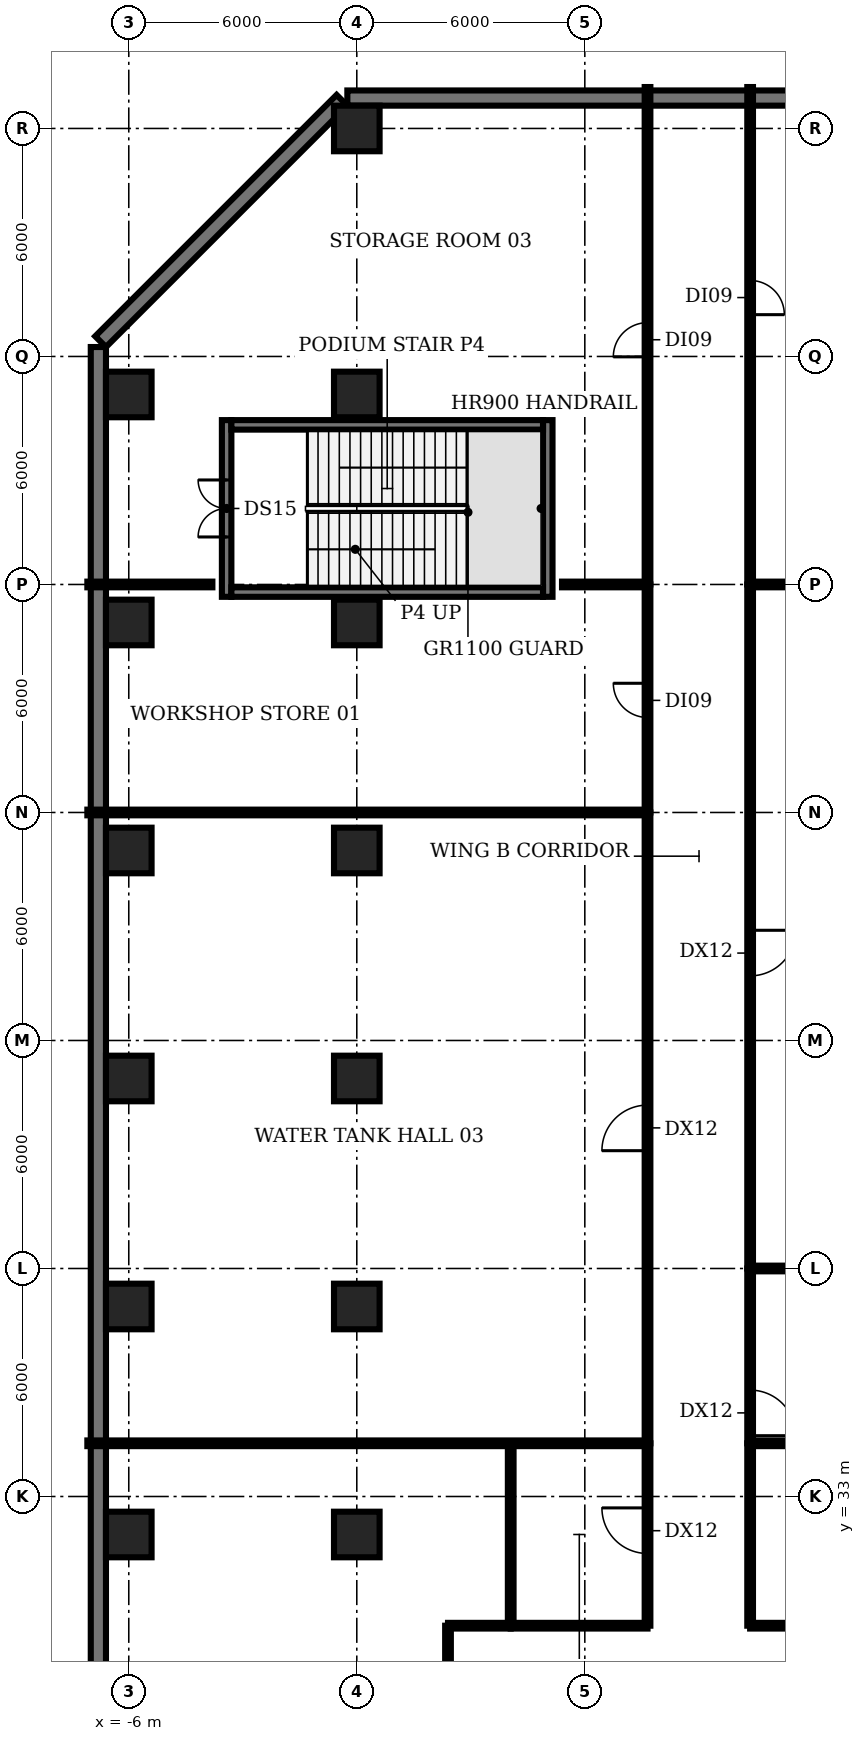
"""IFC4 building model, lengths in metres.
Left out: names, types, materials, properties, quantities, classifications, styles, units other than length and angle.
Written with IfcOpenShell. Run it as: python <this file> out.ifc"""

import sys

from ifc_helpers import new_model, si_unit, direction, frame, frame_2d, origin, origin_2d, place, context, subcontext, project, spatial, rectangle, extrude, element, fill, save


model = new_model("IFC4")
c1 = context("Model", 3, precision=1e-05, world=origin(), true_north=direction((0.0, 1.0)))
c2 = subcontext(c1, "Body", "Model", "MODEL_VIEW")
j1 = project(units=[si_unit("LENGTHUNIT", "METRE"), si_unit("PLANEANGLEUNIT", "RADIAN")], contexts=[c1])
p1 = place(None, origin())
s1 = spatial("IfcSite", under=j1, at=p1, CompositionType="ELEMENT")
p2 = place(p1, origin())
s2 = spatial("IfcBuilding", under=s1, at=p2, CompositionType="ELEMENT")
p3 = place(p2, frame((0.0, 0.0, -6.0)))
s3 = spatial("IfcBuildingStorey", under=s2, at=p3, CompositionType="ELEMENT", Elevation=-6.0)
for number, where, z_axis, x_axis in (
    (1, (-6.0, 32.0, -0.3), (0.0, 0.0, 1.0), (1.0, 0.0, 0.0)),
    (2, (-6.0, 38.0, -0.3), (0.0, 0.0, 1.0), (1.0, 0.0, 0.0)),
    (3, (-6.0, 44.0, -0.3), (0.0, 0.0, 1.0), (1.0, 0.0, 0.0)),
    (4, (-6.0, 50.0, -0.3), (0.0, 0.0, 1.0), (1.0, 0.0, 0.0)),
    (5, (-6.0, 56.0, -0.3), (0.0, 0.0, 1.0), (1.0, 0.0, 0.0)),
    (6, (-6.0, 62.0, -0.3), (0.0, 0.0, 1.0), (1.0, 0.0, 0.0)),
    (7, (0.0, 32.0, -0.3), (0.0, 0.0, 1.0), (1.0, 0.0, 0.0)),
    (8, (0.0, 38.0, -0.3), (0.0, 0.0, 1.0), (1.0, 0.0, 0.0)),
    (9, (0.0, 44.0, -0.3), (0.0, 0.0, 1.0), (1.0, 0.0, 0.0)),
    (10, (0.0, 50.0, -0.3), (0.0, 0.0, 1.0), (1.0, 0.0, 0.0)),
    (11, (0.0, 56.0, -0.3), (0.0, 0.0, 1.0), (1.0, 0.0, 0.0)),
    (12, (0.0, 62.0, -0.3), (0.0, 0.0, 1.0), (1.0, 0.0, 0.0)),
    (13, (0.0, 69.0, -0.3), (0.0, 0.0, 1.0), (1.0, 0.0, 0.0)),
):
    element("IfcColumn", number, at=place(p3, frame(where, z_axis=z_axis, x_axis=x_axis)), inside=s3, PredefinedType="COLUMN", context=c2, shape_type="SweptSolid", body=[
        extrude(rectangle(XDim=1.2, YDim=1.2, at=origin_2d()), origin(), (0.0, 0.0, 1.0), 5.95),
    ])
p4 = place(p3, frame((90.249, 69.8, 0.0), z_axis=(0.0, 0.0, 1.0), x_axis=(-1.0, 0.0, 0.0)))
e14 = element("IfcWall", 14, at=p4, inside=s3, PredefinedType="SOLIDWALL", context=c2, shape_type="SweptSolid", body=[
    extrude(rectangle(XDim=90.497, YDim=0.4, at=frame_2d((45.249, 0.0))), origin(), (0.0, 0.0, 1.0), 5.65),
])
p5 = place(p3, frame((-0.39, 69.741, 0.0), z_axis=(0.0, 0.0, 1.0), x_axis=(-0.707106781187, -0.707106781187, 0.0)))
e15 = element("IfcWall", 15, at=p5, inside=s3, PredefinedType="SOLIDWALL", context=c2, shape_type="SweptSolid", body=[
    extrude(rectangle(XDim=8.982, YDim=0.4, at=frame_2d((4.491, 0.0))), origin(), (0.0, 0.0, 1.0), 5.65),
])
p6 = place(p3, frame((-6.8, 63.249, 0.0), z_axis=(0.0, 0.0, 1.0), x_axis=(0.0, -1.0, 0.0)))
e16 = element("IfcWall", 16, at=p6, inside=s3, PredefinedType="SOLIDWALL", context=c2, shape_type="SweptSolid", body=[
    extrude(rectangle(XDim=66.497, YDim=0.4, at=frame_2d((33.249, 0.0))), origin(), (0.0, 0.0, 1.0), 5.65),
])
p7 = place(p3, frame((-3.425, 56.675, 0.0), z_axis=(0.0, 0.0, 1.0), x_axis=(0.0, 1.0, 0.0)))
e17 = element("IfcWall", 17, at=p7, inside=s3, PredefinedType="SHEAR", context=c2, shape_type="SweptSolid", body=[
    extrude(rectangle(XDim=4.65, YDim=0.25, at=frame_2d((2.325, 0.0))), origin(), (0.0, 0.0, 1.0), 5.65),
])
p8 = place(p7, frame((1.575, 0.0, 0.0)))
e18 = element("IfcOpeningElement", 18, at=p8, cuts=e17, PredefinedType="OPENING", context=c2, shape_type="SweptSolid", body=[
    extrude(rectangle(XDim=1.5, YDim=2.1, at=frame_2d((0.75, 1.05))), frame((0.0, 0.135, 0.0), z_axis=(0.0, -1.0, 0.0), x_axis=(1.0, 0.0, 0.0)), (0.0, 0.0, 1.0), 0.27),
])
p9 = place(p3, frame((5.025, 56.675, 0.0), z_axis=(0.0, 0.0, 1.0), x_axis=(0.0, 1.0, 0.0)))
e19 = element("IfcWall", 19, at=p9, inside=s3, PredefinedType="SHEAR", context=c2, shape_type="SweptSolid", body=[
    extrude(rectangle(XDim=4.65, YDim=0.25, at=frame_2d((2.325, 0.0))), origin(), (0.0, 0.0, 1.0), 5.65),
])
for number, where, z_axis, x_axis in (
    (20, (-3.3, 56.8, 0.0), (0.0, 0.0, 1.0), (1.0, 0.0, 0.0)),
    (21, (-3.3, 61.2, 0.0), (0.0, 0.0, 1.0), (1.0, 0.0, 0.0)),
):
    element("IfcWall", number, at=place(p3, frame(where, z_axis=z_axis, x_axis=x_axis)), inside=s3, PredefinedType="SHEAR", context=c2, shape_type="SweptSolid", body=[
        extrude(rectangle(XDim=8.2, YDim=0.25, at=frame_2d((4.1, 0.0))), origin(), (0.0, 0.0, 1.0), 5.65),
    ])
for number, where, z_axis, x_axis in (
    (22, (-7.09, 34.4, 0.0), (0.0, 0.0, 1.0), (1.0, 0.0, 0.0)),
    (23, (-7.09, 51.0, 0.0), (0.0, 0.0, 1.0), (1.0, 0.0, 0.0)),
):
    element("IfcWall", number, at=place(p3, frame(where, z_axis=z_axis, x_axis=x_axis)), inside=s3, PredefinedType="PARTITIONING", context=c2, shape_type="SweptSolid", body=[
        extrude(rectangle(XDim=14.74, YDim=0.15, at=frame_2d((7.37, 0.0))), origin(), (0.0, 0.0, 1.0), 4.7),
    ])
p10 = place(p3, frame((-7.09, 57.0, 0.0), z_axis=(0.0, 0.0, 1.0), x_axis=(1.0, 0.0, 0.0)))
e24 = element("IfcWall", 24, at=p10, inside=s3, PredefinedType="PARTITIONING", context=c2, shape_type="SweptSolid", body=[
    extrude(rectangle(XDim=3.29, YDim=0.15, at=frame_2d((1.645, 0.0))), origin(), (0.0, 0.0, 1.0), 4.7),
])
p11 = place(p3, frame((2.4, 25.7, 0.0), z_axis=(0.0, 0.0, 1.0), x_axis=(0.0, 1.0, 0.0)))
e25 = element("IfcWall", 25, at=p11, inside=s3, PredefinedType="PARTITIONING", context=c2, shape_type="SweptSolid", body=[
    extrude(rectangle(XDim=3.9, YDim=0.15, at=frame_2d((1.95, 0.0))), origin(), (0.0, 0.0, 1.0), 4.7),
])
p12 = place(p3, frame((2.4, 29.6, 0.0), z_axis=(0.0, 0.0, 1.0), x_axis=(1.0, 0.0, 0.0)))
e26 = element("IfcWall", 26, at=p12, inside=s3, PredefinedType="PARTITIONING", context=c2, shape_type="SweptSolid", body=[
    extrude(rectangle(XDim=1.65, YDim=0.15, at=frame_2d((0.825, 0.0))), origin(), (0.0, 0.0, 1.0), 4.7),
])
p13 = place(p3, frame((4.05, 29.6, 0.0), z_axis=(0.0, 0.0, 1.0), x_axis=(0.0, 1.0, 0.0)))
e27 = element("IfcWall", 27, at=p13, inside=s3, PredefinedType="PARTITIONING", context=c2, shape_type="SweptSolid", body=[
    extrude(rectangle(XDim=4.8, YDim=0.15, at=frame_2d((2.4, 0.0))), origin(), (0.0, 0.0, 1.0), 4.7),
])
p14 = place(p3, frame((4.05, 29.6, 0.0), z_axis=(0.0, 0.0, 1.0), x_axis=(1.0, 0.0, 0.0)))
e28 = element("IfcWall", 28, at=p14, inside=s3, PredefinedType="PARTITIONING", context=c2, shape_type="SweptSolid", body=[
    extrude(rectangle(XDim=3.6, YDim=0.15, at=frame_2d((1.8, 0.0))), origin(), (0.0, 0.0, 1.0), 4.7),
])
p15 = place(p3, frame((5.4, 57.0, 0.0), z_axis=(0.0, 0.0, 1.0), x_axis=(1.0, 0.0, 0.0)))
e29 = element("IfcWall", 29, at=p15, inside=s3, PredefinedType="PARTITIONING", context=c2, shape_type="SweptSolid", body=[
    extrude(rectangle(XDim=2.25, YDim=0.15, at=frame_2d((1.125, 0.0))), origin(), (0.0, 0.0, 1.0), 4.7),
])
p16 = place(p3, frame((7.65, 29.6, 0.0), z_axis=(0.0, 0.0, 1.0), x_axis=(0.0, 1.0, 0.0)))
e30 = element("IfcWall", 30, at=p16, inside=s3, PredefinedType="PARTITIONING", context=c2, shape_type="SweptSolid", body=[
    extrude(rectangle(XDim=4.8, YDim=0.15, at=frame_2d((2.4, 0.0))), origin(), (0.0, 0.0, 1.0), 4.7),
])
p17 = place(p16, frame((1.9, 0.0, 0.0)))
e31 = element("IfcOpeningElement", 31, at=p17, cuts=e30, PredefinedType="OPENING", context=c2, shape_type="SweptSolid", body=[
    extrude(rectangle(XDim=1.2, YDim=2.1, at=frame_2d((0.6, 1.05))), frame((0.0, 0.085, 0.0), z_axis=(0.0, -1.0, 0.0), x_axis=(1.0, 0.0, 0.0)), (0.0, 0.0, 1.0), 0.17),
])
p18 = place(p3, frame((7.65, 34.4, 0.0), z_axis=(0.0, 0.0, 1.0), x_axis=(0.0, 1.0, 0.0)))
e32 = element("IfcWall", 32, at=p18, inside=s3, PredefinedType="PARTITIONING", context=c2, shape_type="SweptSolid", body=[
    extrude(rectangle(XDim=16.6, YDim=0.15, at=frame_2d((8.3, 0.0))), origin(), (0.0, 0.0, 1.0), 4.7),
])
p19 = place(p18, frame((7.7, 0.0, 0.0)))
e33 = element("IfcOpeningElement", 33, at=p19, cuts=e32, PredefinedType="OPENING", context=c2, shape_type="SweptSolid", body=[
    extrude(rectangle(XDim=1.2, YDim=2.1, at=frame_2d((0.6, 1.05))), frame((0.0, 0.085, 0.0), z_axis=(0.0, -1.0, 0.0), x_axis=(1.0, 0.0, 0.0)), (0.0, 0.0, 1.0), 0.17),
])
p20 = place(p3, frame((7.65, 51.0, 0.0), z_axis=(0.0, 0.0, 1.0), x_axis=(0.0, 1.0, 0.0)))
e34 = element("IfcWall", 34, at=p20, inside=s3, PredefinedType="PARTITIONING", context=c2, shape_type="SweptSolid", body=[
    extrude(rectangle(XDim=6.0, YDim=0.15, at=frame_2d((3.0, 0.0))), origin(), (0.0, 0.0, 1.0), 4.7),
])
p21 = place(p20, frame((2.5, 0.0, 0.0)))
e35 = element("IfcOpeningElement", 35, at=p21, cuts=e34, PredefinedType="OPENING", context=c2, shape_type="SweptSolid", body=[
    extrude(rectangle(XDim=0.9, YDim=2.1, at=frame_2d((0.45, 1.05))), frame((0.0, 0.085, 0.0), z_axis=(0.0, -1.0, 0.0), x_axis=(1.0, 0.0, 0.0)), (0.0, 0.0, 1.0), 0.17),
])
p22 = place(p3, frame((7.65, 57.0, 0.0), z_axis=(0.0, 0.0, 1.0), x_axis=(0.0, 1.0, 0.0)))
e36 = element("IfcWall", 36, at=p22, inside=s3, PredefinedType="PARTITIONING", context=c2, shape_type="SweptSolid", body=[
    extrude(rectangle(XDim=13.09, YDim=0.15, at=frame_2d((6.545, 0.0))), origin(), (0.0, 0.0, 1.0), 4.7),
])
p23 = place(p22, frame((5.99, 0.0, 0.0)))
e37 = element("IfcOpeningElement", 37, at=p23, cuts=e36, PredefinedType="OPENING", context=c2, shape_type="SweptSolid", body=[
    extrude(rectangle(XDim=0.9, YDim=2.1, at=frame_2d((0.45, 1.05))), frame((0.0, 0.085, 0.0), z_axis=(0.0, -1.0, 0.0), x_axis=(1.0, 0.0, 0.0)), (0.0, 0.0, 1.0), 0.17),
])
p24 = place(p3, frame((10.35, 29.6, 0.0), z_axis=(0.0, 0.0, 1.0), x_axis=(0.0, 1.0, 0.0)))
e38 = element("IfcWall", 38, at=p24, inside=s3, PredefinedType="PARTITIONING", context=c2, shape_type="SweptSolid", body=[
    extrude(rectangle(XDim=4.8, YDim=0.15, at=frame_2d((2.4, 0.0))), origin(), (0.0, 0.0, 1.0), 4.7),
])
p25 = place(p3, frame((10.35, 29.6, 0.0), z_axis=(0.0, 0.0, 1.0), x_axis=(1.0, 0.0, 0.0)))
e39 = element("IfcWall", 39, at=p25, inside=s3, PredefinedType="PARTITIONING", context=c2, shape_type="SweptSolid", body=[
    extrude(rectangle(XDim=4.05, YDim=0.15, at=frame_2d((2.025, 0.0))), origin(), (0.0, 0.0, 1.0), 4.7),
])
p26 = place(p3, frame((10.35, 34.4, 0.0), z_axis=(0.0, 0.0, 1.0), x_axis=(1.0, 0.0, 0.0)))
e40 = element("IfcWall", 40, at=p26, inside=s3, PredefinedType="PARTITIONING", context=c2, shape_type="SweptSolid", body=[
    extrude(rectangle(XDim=17.25, YDim=0.15, at=frame_2d((8.625, 0.0))), origin(), (0.0, 0.0, 1.0), 4.7),
])
p27 = place(p3, frame((10.35, 39.0, 0.0), z_axis=(0.0, 0.0, 1.0), x_axis=(0.0, -1.0, 0.0)))
e41 = element("IfcWall", 41, at=p27, inside=s3, PredefinedType="PARTITIONING", context=c2, shape_type="SweptSolid", body=[
    extrude(rectangle(XDim=4.6, YDim=0.15, at=frame_2d((2.3, 0.0))), origin(), (0.0, 0.0, 1.0), 4.7),
])
p28 = place(p27, frame((3.2, 0.0, 0.0)))
e42 = element("IfcOpeningElement", 42, at=p28, cuts=e41, PredefinedType="OPENING", context=c2, shape_type="SweptSolid", body=[
    extrude(rectangle(XDim=1.2, YDim=2.1, at=frame_2d((0.6, 1.05))), frame((0.0, 0.085, 0.0), z_axis=(0.0, -1.0, 0.0), x_axis=(1.0, 0.0, 0.0)), (0.0, 0.0, 1.0), 0.17),
])
p29 = place(p3, frame((10.35, 39.0, 0.0), z_axis=(0.0, 0.0, 1.0), x_axis=(1.0, 0.0, 0.0)))
e43 = element("IfcWall", 43, at=p29, inside=s3, PredefinedType="PARTITIONING", context=c2, shape_type="SweptSolid", body=[
    extrude(rectangle(XDim=17.25, YDim=0.15, at=frame_2d((8.625, 0.0))), origin(), (0.0, 0.0, 1.0), 4.7),
])
p30 = place(p3, frame((10.35, 57.0, 0.0), z_axis=(0.0, 0.0, 1.0), x_axis=(0.0, -1.0, 0.0)))
e44 = element("IfcWall", 44, at=p30, inside=s3, PredefinedType="PARTITIONING", context=c2, shape_type="SweptSolid", body=[
    extrude(rectangle(XDim=18.0, YDim=0.15, at=frame_2d((9.0, 0.0))), origin(), (0.0, 0.0, 1.0), 4.7),
])
p31 = place(p30, frame((9.1, 0.0, 0.0)))
e45 = element("IfcOpeningElement", 45, at=p31, cuts=e44, PredefinedType="OPENING", context=c2, shape_type="SweptSolid", body=[
    extrude(rectangle(XDim=1.2, YDim=2.1, at=frame_2d((0.6, 1.05))), frame((0.0, 0.085, 0.0), z_axis=(0.0, -1.0, 0.0), x_axis=(1.0, 0.0, 0.0)), (0.0, 0.0, 1.0), 0.17),
])
p32 = place(p3, frame((10.35, 57.0, 0.0), z_axis=(0.0, 0.0, 1.0), x_axis=(1.0, 0.0, 0.0)))
e46 = element("IfcWall", 46, at=p32, inside=s3, PredefinedType="PARTITIONING", context=c2, shape_type="SweptSolid", body=[
    extrude(rectangle(XDim=17.25, YDim=0.15, at=frame_2d((8.625, 0.0))), origin(), (0.0, 0.0, 1.0), 4.7),
])
p33 = place(p3, frame((10.35, 70.09, 0.0), z_axis=(0.0, 0.0, 1.0), x_axis=(0.0, -1.0, 0.0)))
e47 = element("IfcWall", 47, at=p33, inside=s3, PredefinedType="PARTITIONING", context=c2, shape_type="SweptSolid", body=[
    extrude(rectangle(XDim=13.09, YDim=0.15, at=frame_2d((6.545, 0.0))), origin(), (0.0, 0.0, 1.0), 4.7),
])
p34 = place(p33, frame((5.09, 0.0, 0.0)))
e48 = element("IfcOpeningElement", 48, at=p34, cuts=e47, PredefinedType="OPENING", context=c2, shape_type="SweptSolid", body=[
    extrude(rectangle(XDim=0.9, YDim=2.1, at=frame_2d((0.45, 1.05))), frame((0.0, 0.085, 0.0), z_axis=(0.0, -1.0, 0.0), x_axis=(1.0, 0.0, 0.0)), (0.0, 0.0, 1.0), 0.17),
])
p35 = place(p8, origin())
e49 = element("IfcDoor", 49, at=p35, inside=s3, OperationType="DOUBLE_DOOR_SINGLE_SWING", PredefinedType="DOOR", context=c2, shape_type="SweptSolid", body=[
    extrude(rectangle(XDim=1.5, YDim=2.1, at=frame_2d((0.75, 1.05))), frame((0.0, 0.025, 0.0), z_axis=(0.0, -1.0, 0.0), x_axis=(1.0, 0.0, 0.0)), (0.0, 0.0, 1.0), 0.05),
])
fill(e18, e49)
p36 = place(p17, origin())
e50 = element("IfcDoor", 50, at=p36, inside=s3, OperationType="SINGLE_SWING_RIGHT", PredefinedType="DOOR", context=c2, shape_type="SweptSolid", body=[
    extrude(rectangle(XDim=1.2, YDim=2.1, at=frame_2d((0.6, 1.05))), frame((0.0, 0.025, 0.0), z_axis=(0.0, -1.0, 0.0), x_axis=(1.0, 0.0, 0.0)), (0.0, 0.0, 1.0), 0.05),
])
fill(e31, e50)
p37 = place(p19, origin())
e51 = element("IfcDoor", 51, at=p37, inside=s3, OperationType="SINGLE_SWING_LEFT", PredefinedType="DOOR", context=c2, shape_type="SweptSolid", body=[
    extrude(rectangle(XDim=1.2, YDim=2.1, at=frame_2d((0.6, 1.05))), frame((0.0, 0.025, 0.0), z_axis=(0.0, -1.0, 0.0), x_axis=(1.0, 0.0, 0.0)), (0.0, 0.0, 1.0), 0.05),
])
fill(e33, e51)
p38 = place(p21, origin())
e52 = element("IfcDoor", 52, at=p38, inside=s3, OperationType="SINGLE_SWING_RIGHT", PredefinedType="DOOR", context=c2, shape_type="SweptSolid", body=[
    extrude(rectangle(XDim=0.9, YDim=2.1, at=frame_2d((0.45, 1.05))), frame((0.0, 0.025, 0.0), z_axis=(0.0, -1.0, 0.0), x_axis=(1.0, 0.0, 0.0)), (0.0, 0.0, 1.0), 0.05),
])
fill(e35, e52)
p39 = place(p23, origin())
e53 = element("IfcDoor", 53, at=p39, inside=s3, OperationType="SINGLE_SWING_LEFT", PredefinedType="DOOR", context=c2, shape_type="SweptSolid", body=[
    extrude(rectangle(XDim=0.9, YDim=2.1, at=frame_2d((0.45, 1.05))), frame((0.0, 0.025, 0.0), z_axis=(0.0, -1.0, 0.0), x_axis=(1.0, 0.0, 0.0)), (0.0, 0.0, 1.0), 0.05),
])
fill(e37, e53)
p40 = place(p28, origin())
e54 = element("IfcDoor", 54, at=p40, inside=s3, OperationType="SINGLE_SWING_RIGHT", PredefinedType="DOOR", context=c2, shape_type="SweptSolid", body=[
    extrude(rectangle(XDim=1.2, YDim=2.1, at=frame_2d((0.6, 1.05))), frame((0.0, 0.025, 0.0), z_axis=(0.0, -1.0, 0.0), x_axis=(1.0, 0.0, 0.0)), (0.0, 0.0, 1.0), 0.05),
])
fill(e42, e54)
p41 = place(p31, origin())
e55 = element("IfcDoor", 55, at=p41, inside=s3, OperationType="SINGLE_SWING_LEFT", PredefinedType="DOOR", context=c2, shape_type="SweptSolid", body=[
    extrude(rectangle(XDim=1.2, YDim=2.1, at=frame_2d((0.6, 1.05))), frame((0.0, 0.025, 0.0), z_axis=(0.0, -1.0, 0.0), x_axis=(1.0, 0.0, 0.0)), (0.0, 0.0, 1.0), 0.05),
])
fill(e45, e55)
p42 = place(p34, origin())
e56 = element("IfcDoor", 56, at=p42, inside=s3, OperationType="SINGLE_SWING_RIGHT", PredefinedType="DOOR", context=c2, shape_type="SweptSolid", body=[
    extrude(rectangle(XDim=0.9, YDim=2.1, at=frame_2d((0.45, 1.05))), frame((0.0, 0.025, 0.0), z_axis=(0.0, -1.0, 0.0), x_axis=(1.0, 0.0, 0.0)), (0.0, 0.0, 1.0), 0.05),
])
fill(e48, e56)
save(model, sys.argv[1])
